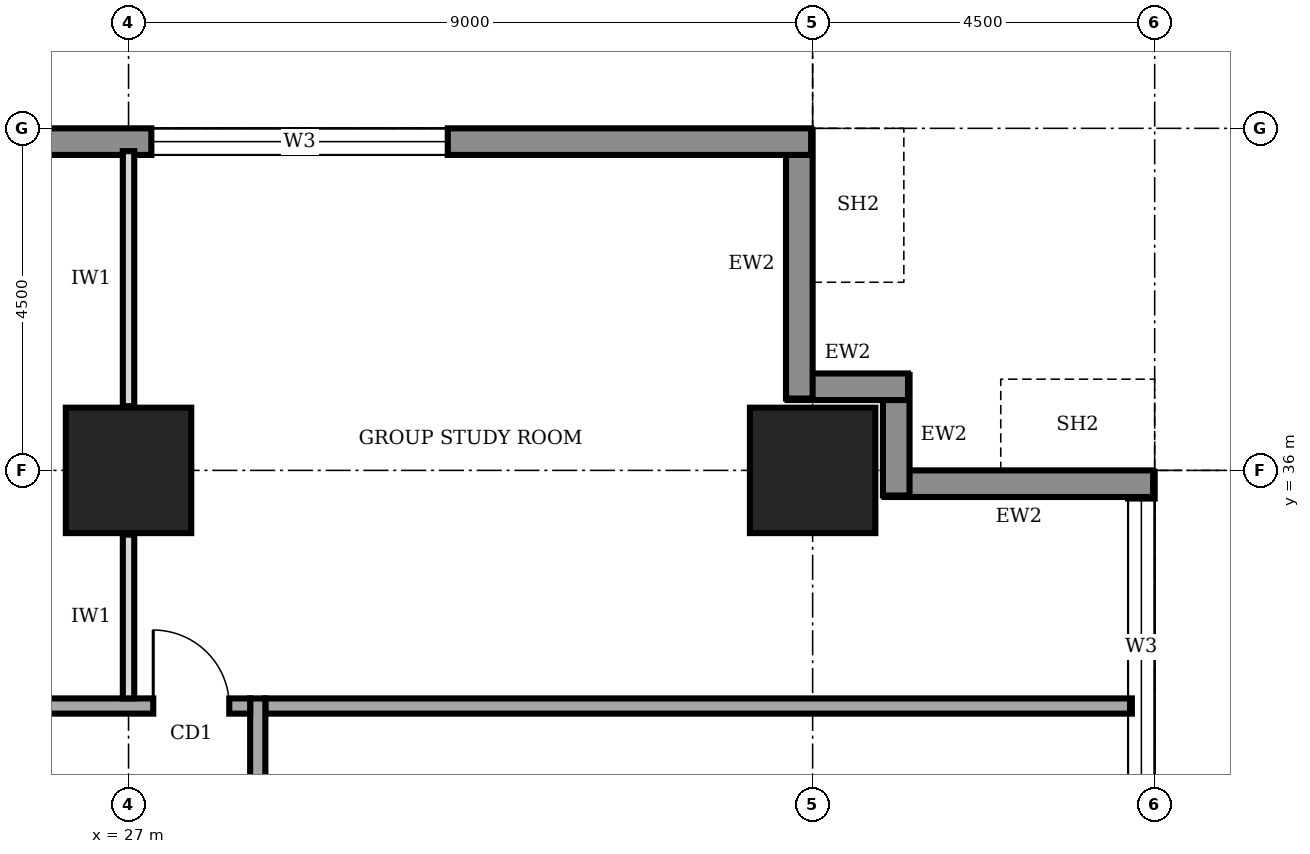
"""IFC4 building model, lengths in metres.
Left out: names, types, materials, properties, quantities, classifications, styles, units other than length and angle.
Written with IfcOpenShell. Run it as: python <this file> out.ifc"""

import sys

from ifc_helpers import new_model, si_unit, direction, frame, frame_2d, origin, origin_2d, place, context, subcontext, project, spatial, rectangle, extrude, element, fill, save


model = new_model("IFC4")
c1 = context("Model", 3, precision=1e-05, world=origin(), true_north=direction((0.0, 1.0)))
c2 = subcontext(c1, "Body", "Model", "MODEL_VIEW")
j1 = project(units=[si_unit("LENGTHUNIT", "METRE"), si_unit("PLANEANGLEUNIT", "RADIAN")], contexts=[c1])
p1 = place(None, origin())
s1 = spatial("IfcSite", under=j1, at=p1, CompositionType="ELEMENT")
p2 = place(p1, origin())
s2 = spatial("IfcBuilding", under=s1, at=p2, CompositionType="ELEMENT")
p3 = place(p2, frame((0.0, 0.0, 189.0)))
s3 = spatial("IfcBuildingStorey", under=s2, at=p3, CompositionType="ELEMENT", Elevation=189.0)
for number, where, z_axis, x_axis in (
    (1, (27.0, 36.0, 0.0), (0.0, 0.0, 1.0), (1.0, 0.0, 0.0)),
    (2, (36.0, 36.0, 0.0), (0.0, 0.0, 1.0), (1.0, 0.0, 0.0)),
):
    element("IfcColumn", number, at=place(p3, frame(where, z_axis=z_axis, x_axis=x_axis)), inside=s3, PredefinedType="COLUMN", context=c2, shape_type="SweptSolid", body=[
        extrude(rectangle(XDim=1.65, YDim=1.65, at=origin_2d()), origin(), (0.0, 0.0, 1.0), 4.0),
    ])
p4 = place(p3, frame((40.325, 4.52, 0.0), z_axis=(0.0, 0.0, 1.0), x_axis=(0.0, 1.0, 0.0)))
e3 = element("IfcWall", 3, at=p4, inside=s3, PredefinedType="STANDARD", context=c2, shape_type="SweptSolid", body=[
    extrude(rectangle(XDim=31.46, YDim=0.35, at=frame_2d((15.73, 0.0))), origin(), (0.0, 0.0, 1.0), 3.75),
])
p5 = place(p4, frame((4.78, 0.0, 0.95)))
e4 = element("IfcOpeningElement", 4, at=p5, cuts=e3, PredefinedType="OPENING", context=c2, shape_type="SweptSolid", body=[
    extrude(rectangle(XDim=3.9, YDim=1.8, at=frame_2d((1.95, 0.9))), frame((0.0, 0.185, 0.0), z_axis=(0.0, -1.0, 0.0), x_axis=(1.0, 0.0, 0.0)), (0.0, 0.0, 1.0), 0.37),
])
p6 = place(p4, frame((9.28, 0.0, 0.95)))
e5 = element("IfcOpeningElement", 5, at=p6, cuts=e3, PredefinedType="OPENING", context=c2, shape_type="SweptSolid", body=[
    extrude(rectangle(XDim=3.9, YDim=1.8, at=frame_2d((1.95, 0.9))), frame((0.0, 0.185, 0.0), z_axis=(0.0, -1.0, 0.0), x_axis=(1.0, 0.0, 0.0)), (0.0, 0.0, 1.0), 0.37),
])
p7 = place(p4, frame((13.78, 0.0, 0.95)))
e6 = element("IfcOpeningElement", 6, at=p7, cuts=e3, PredefinedType="OPENING", context=c2, shape_type="SweptSolid", body=[
    extrude(rectangle(XDim=3.9, YDim=1.8, at=frame_2d((1.95, 0.9))), frame((0.0, 0.185, 0.0), z_axis=(0.0, -1.0, 0.0), x_axis=(1.0, 0.0, 0.0)), (0.0, 0.0, 1.0), 0.37),
])
p8 = place(p4, frame((18.28, 0.0, 0.95)))
e7 = element("IfcOpeningElement", 7, at=p8, cuts=e3, PredefinedType="OPENING", context=c2, shape_type="SweptSolid", body=[
    extrude(rectangle(XDim=3.9, YDim=1.8, at=frame_2d((1.95, 0.9))), frame((0.0, 0.185, 0.0), z_axis=(0.0, -1.0, 0.0), x_axis=(1.0, 0.0, 0.0)), (0.0, 0.0, 1.0), 0.37),
])
p9 = place(p4, frame((22.78, 0.0, 0.95)))
e8 = element("IfcOpeningElement", 8, at=p9, cuts=e3, PredefinedType="OPENING", context=c2, shape_type="SweptSolid", body=[
    extrude(rectangle(XDim=3.9, YDim=1.8, at=frame_2d((1.95, 0.9))), frame((0.0, 0.185, 0.0), z_axis=(0.0, -1.0, 0.0), x_axis=(1.0, 0.0, 0.0)), (0.0, 0.0, 1.0), 0.37),
])
p10 = place(p4, frame((27.21, 0.0, 0.95)))
e9 = element("IfcOpeningElement", 9, at=p10, cuts=e3, PredefinedType="OPENING", context=c2, shape_type="SweptSolid", body=[
    extrude(rectangle(XDim=3.9, YDim=1.8, at=frame_2d((1.95, 0.9))), frame((0.0, 0.185, 0.0), z_axis=(0.0, -1.0, 0.0), x_axis=(1.0, 0.0, 0.0)), (0.0, 0.0, 1.0), 0.37),
])
p11 = place(p3, frame((40.48, 35.825, 0.0), z_axis=(0.0, 0.0, 1.0), x_axis=(-1.0, 0.0, 0.0)))
e10 = element("IfcWall", 10, at=p11, inside=s3, PredefinedType="STANDARD", context=c2, shape_type="SweptSolid", body=[
    extrude(rectangle(XDim=3.535, YDim=0.35, at=frame_2d((1.768, 0.0))), origin(), (0.0, 0.0, 1.0), 2.85),
])
for number, where, z_axis, x_axis in (
    (11, (37.1, 35.67, 0.0), (0.0, 0.0, 1.0), (0.0, 1.0, 0.0)),
    (12, (37.255, 37.1, 0.0), (0.0, 0.0, 1.0), (-1.0, 0.0, 0.0)),
):
    element("IfcWall", number, at=place(p3, frame(where, z_axis=z_axis, x_axis=x_axis)), inside=s3, PredefinedType="STANDARD", context=c2, shape_type="SweptSolid", body=[
        extrude(rectangle(XDim=1.585, YDim=0.35, at=frame_2d((0.792, 0.0))), origin(), (0.0, 0.0, 1.0), 3.75),
    ])
p12 = place(p3, frame((35.825, 36.945, 0.0), z_axis=(0.0, 0.0, 1.0), x_axis=(0.0, 1.0, 0.0)))
e13 = element("IfcWall", 13, at=p12, inside=s3, PredefinedType="STANDARD", context=c2, shape_type="SweptSolid", body=[
    extrude(rectangle(XDim=3.535, YDim=0.35, at=frame_2d((1.768, 0.0))), origin(), (0.0, 0.0, 1.0), 2.85),
])
p13 = place(p3, frame((35.98, 40.325, 0.0), z_axis=(0.0, 0.0, 1.0), x_axis=(-1.0, 0.0, 0.0)))
e14 = element("IfcWall", 14, at=p13, inside=s3, PredefinedType="STANDARD", context=c2, shape_type="SweptSolid", body=[
    extrude(rectangle(XDim=31.46, YDim=0.35, at=frame_2d((15.73, 0.0))), origin(), (0.0, 0.0, 1.0), 3.75),
])
p14 = place(p13, frame((27.21, 0.0, 0.95)))
e15 = element("IfcOpeningElement", 15, at=p14, cuts=e14, PredefinedType="OPENING", context=c2, shape_type="SweptSolid", body=[
    extrude(rectangle(XDim=3.9, YDim=1.8, at=frame_2d((1.95, 0.9))), frame((0.0, 0.185, 0.0), z_axis=(0.0, -1.0, 0.0), x_axis=(1.0, 0.0, 0.0)), (0.0, 0.0, 1.0), 0.37),
])
p15 = place(p13, frame((22.78, 0.0, 0.95)))
e16 = element("IfcOpeningElement", 16, at=p15, cuts=e14, PredefinedType="OPENING", context=c2, shape_type="SweptSolid", body=[
    extrude(rectangle(XDim=3.9, YDim=1.8, at=frame_2d((1.95, 0.9))), frame((0.0, 0.185, 0.0), z_axis=(0.0, -1.0, 0.0), x_axis=(1.0, 0.0, 0.0)), (0.0, 0.0, 1.0), 0.37),
])
p16 = place(p13, frame((4.78, 0.0, 0.95)))
e17 = element("IfcOpeningElement", 17, at=p16, cuts=e14, PredefinedType="OPENING", context=c2, shape_type="SweptSolid", body=[
    extrude(rectangle(XDim=3.9, YDim=1.8, at=frame_2d((1.95, 0.9))), frame((0.0, 0.185, 0.0), z_axis=(0.0, -1.0, 0.0), x_axis=(1.0, 0.0, 0.0)), (0.0, 0.0, 1.0), 0.37),
])
p17 = place(p3, frame((28.7, 7.7, 0.0), z_axis=(0.0, 0.0, 1.0), x_axis=(0.0, 1.0, 0.0)))
e18 = element("IfcWall", 18, at=p17, inside=s3, PredefinedType="SOLIDWALL", context=c2, shape_type="SweptSolid", body=[
    extrude(rectangle(XDim=25.3, YDim=0.2, at=frame_2d((12.65, 0.0))), origin(), (0.0, 0.0, 1.0), 3.75),
])
p18 = place(p17, frame((4.15, 0.0, 0.0)))
e19 = element("IfcOpeningElement", 19, at=p18, cuts=e18, PredefinedType="OPENING", context=c2, shape_type="SweptSolid", body=[
    extrude(rectangle(XDim=1.8, YDim=2.1, at=frame_2d((0.9, 1.05))), frame((0.0, 0.11, 0.0), z_axis=(0.0, -1.0, 0.0), x_axis=(1.0, 0.0, 0.0)), (0.0, 0.0, 1.0), 0.22),
])
p19 = place(p17, frame((17.1, 0.0, 0.0)))
e20 = element("IfcOpeningElement", 20, at=p19, cuts=e18, PredefinedType="OPENING", context=c2, shape_type="SweptSolid", body=[
    extrude(rectangle(XDim=1.4, YDim=2.1, at=frame_2d((0.7, 1.05))), frame((0.0, 0.11, 0.0), z_axis=(0.0, -1.0, 0.0), x_axis=(1.0, 0.0, 0.0)), (0.0, 0.0, 1.0), 0.22),
])
p20 = place(p3, frame((28.6, 32.9, 0.0), z_axis=(0.0, 0.0, 1.0), x_axis=(-1.0, 0.0, 0.0)))
e21 = element("IfcWall", 21, at=p20, inside=s3, PredefinedType="SOLIDWALL", context=c2, shape_type="SweptSolid", body=[
    extrude(rectangle(XDim=16.9, YDim=0.2, at=frame_2d((8.45, 0.0))), origin(), (0.0, 0.0, 1.0), 3.75),
])
p21 = place(p20, frame((15.425, 0.0, 0.0)))
e22 = element("IfcOpeningElement", 22, at=p21, cuts=e21, PredefinedType="OPENING", context=c2, shape_type="SweptSolid", body=[
    extrude(rectangle(XDim=1.0, YDim=2.1, at=frame_2d((0.5, 1.05))), frame((0.0, 0.11, 0.0), z_axis=(0.0, -1.0, 0.0), x_axis=(1.0, 0.0, 0.0)), (0.0, 0.0, 1.0), 0.22),
])
p22 = place(p20, frame((12.35, 0.0, 0.0)))
e23 = element("IfcOpeningElement", 23, at=p22, cuts=e21, PredefinedType="OPENING", context=c2, shape_type="SweptSolid", body=[
    extrude(rectangle(XDim=1.0, YDim=2.1, at=frame_2d((0.5, 1.05))), frame((0.0, 0.11, 0.0), z_axis=(0.0, -1.0, 0.0), x_axis=(1.0, 0.0, 0.0)), (0.0, 0.0, 1.0), 0.22),
])
p23 = place(p20, frame((5.6, 0.0, 0.0)))
e24 = element("IfcOpeningElement", 24, at=p23, cuts=e21, PredefinedType="OPENING", context=c2, shape_type="SweptSolid", body=[
    extrude(rectangle(XDim=1.0, YDim=2.1, at=frame_2d((0.5, 1.05))), frame((0.0, 0.11, 0.0), z_axis=(0.0, -1.0, 0.0), x_axis=(1.0, 0.0, 0.0)), (0.0, 0.0, 1.0), 0.22),
])
p24 = place(p20, frame((0.275, 0.0, 0.0)))
e25 = element("IfcOpeningElement", 25, at=p24, cuts=e21, PredefinedType="OPENING", context=c2, shape_type="SweptSolid", body=[
    extrude(rectangle(XDim=1.0, YDim=2.1, at=frame_2d((0.5, 1.05))), frame((0.0, 0.11, 0.0), z_axis=(0.0, -1.0, 0.0), x_axis=(1.0, 0.0, 0.0)), (0.0, 0.0, 1.0), 0.22),
])
p25 = place(p3, frame((28.8, 32.9, 0.0), z_axis=(0.0, 0.0, 1.0), x_axis=(1.0, 0.0, 0.0)))
e26 = element("IfcWall", 26, at=p25, inside=s3, PredefinedType="SOLIDWALL", context=c2, shape_type="SweptSolid", body=[
    extrude(rectangle(XDim=11.4, YDim=0.2, at=frame_2d((5.7, 0.0))), origin(), (0.0, 0.0, 1.0), 3.75),
])
p26 = place(p3, frame((27.0, 33.0, 0.0), z_axis=(0.0, 0.0, 1.0), x_axis=(0.0, 1.0, 0.0)))
e27 = element("IfcWall", 27, at=p26, inside=s3, PredefinedType="PARTITIONING", context=c2, shape_type="SweptSolid", body=[
    extrude(rectangle(XDim=2.155, YDim=0.15, at=frame_2d((1.078, 0.0))), origin(), (0.0, 0.0, 1.0), 2.85),
])
p27 = place(p3, frame((27.0, 36.845, 0.0), z_axis=(0.0, 0.0, 1.0), x_axis=(0.0, 1.0, 0.0)))
e28 = element("IfcWall", 28, at=p27, inside=s3, PredefinedType="PARTITIONING", context=c2, shape_type="SweptSolid", body=[
    extrude(rectangle(XDim=3.355, YDim=0.15, at=frame_2d((1.677, 0.0))), origin(), (0.0, 0.0, 1.0), 2.85),
])
p28 = place(p10, origin())
e29 = element("IfcWindow", 29, at=p28, inside=s3, PartitioningType="SINGLE_PANEL", PredefinedType="WINDOW", context=c2, shape_type="SweptSolid", body=[
    extrude(rectangle(XDim=3.9, YDim=1.8, at=frame_2d((1.95, 0.9))), frame((0.0, 0.03, 0.0), z_axis=(0.0, -1.0, 0.0), x_axis=(1.0, 0.0, 0.0)), (0.0, 0.0, 1.0), 0.06),
])
fill(e9, e29)
p29 = place(p16, origin())
e30 = element("IfcWindow", 30, at=p29, inside=s3, PartitioningType="SINGLE_PANEL", PredefinedType="WINDOW", context=c2, shape_type="SweptSolid", body=[
    extrude(rectangle(XDim=3.9, YDim=1.8, at=frame_2d((1.95, 0.9))), frame((0.0, 0.03, 0.0), z_axis=(0.0, -1.0, 0.0), x_axis=(1.0, 0.0, 0.0)), (0.0, 0.0, 1.0), 0.06),
])
fill(e17, e30)
p30 = place(p24, frame((1.0, 0.0, 0.0), z_axis=(0.0, 0.0, 1.0), x_axis=(-1.0, 0.0, 0.0)))
e31 = element("IfcDoor", 31, at=p30, inside=s3, OperationType="SINGLE_SWING_LEFT", PredefinedType="DOOR", context=c2, shape_type="SweptSolid", body=[
    extrude(rectangle(XDim=1.0, YDim=2.1, at=frame_2d((0.5, 1.05))), frame((0.0, 0.025, 0.0), z_axis=(0.0, -1.0, 0.0), x_axis=(1.0, 0.0, 0.0)), (0.0, 0.0, 1.0), 0.05),
])
fill(e25, e31)
save(model, sys.argv[1])
